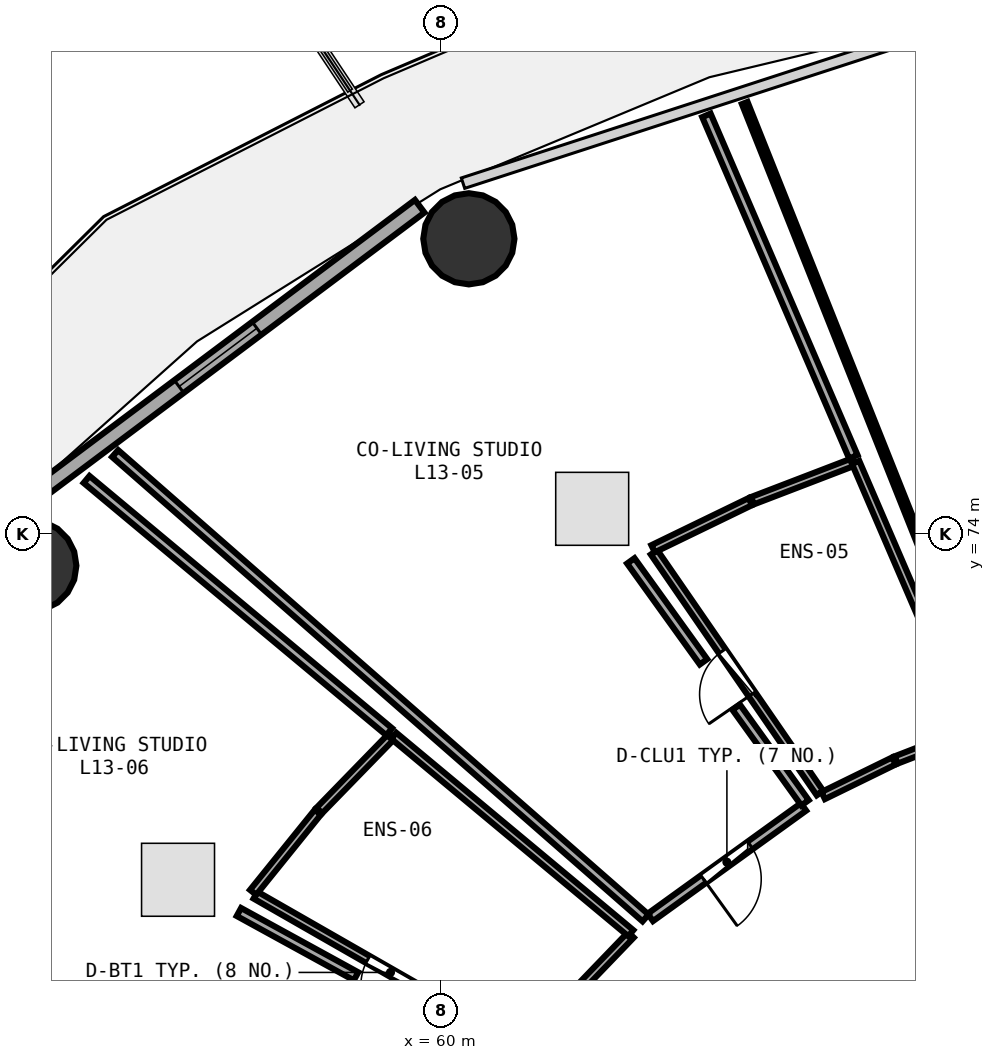
"""IFC4 building model, lengths in metres.
Left out: names, types, materials, properties, quantities, classifications, styles, units other than length and angle.
Written with IfcOpenShell. Run it as: python <this file> out.ifc"""

import sys

from ifc_helpers import new_model, si_unit, direction, frame, frame_2d, origin, origin_2d, place, context, subcontext, project, spatial, rectangle, circle, extrude, element, fill, save


model = new_model("IFC4")
c1 = context("Model", 3, precision=1e-05, world=origin(), true_north=direction((0.0, 1.0)))
c2 = subcontext(c1, "Body", "Model", "MODEL_VIEW")
j1 = project(units=[si_unit("LENGTHUNIT", "METRE"), si_unit("PLANEANGLEUNIT", "RADIAN")], contexts=[c1])
p1 = place(None, origin())
s1 = spatial("IfcSite", under=j1, at=p1, CompositionType="ELEMENT")
p2 = place(p1, origin())
s2 = spatial("IfcBuilding", under=s1, at=p2, CompositionType="ELEMENT")
p3 = place(p2, frame((0.0, 0.0, 52.5)))
s3 = spatial("IfcBuildingStorey", under=s2, at=p3, CompositionType="ELEMENT", Elevation=52.5)
for number, where, z_axis, x_axis in (
    (1, (60.46, 78.854, 0.0), (0.0, 0.0, 1.0), (1.0, 0.0, 0.0)),
    (2, (53.256, 73.478, 0.0), (0.0, 0.0, 1.0), (1.0, 0.0, 0.0)),
):
    element("IfcColumn", number, at=place(p3, frame(where, z_axis=z_axis, x_axis=x_axis)), inside=s3, PredefinedType="COLUMN", context=c2, shape_type="SweptSolid", body=[
        extrude(circle(Radius=0.75, at=origin_2d()), origin(), (0.0, 0.0, 1.0), 3.75),
    ])
p4 = place(p3, frame((59.651, 79.389, 0.0), z_axis=(0.0, 0.0, 1.0), x_axis=(-0.80030733173, -0.599590005569, 0.0)))
e3 = element("IfcWall", 3, at=p4, inside=s3, PredefinedType="SOLIDWALL", context=c2, shape_type="SweptSolid", body=[
    extrude(rectangle(XDim=8.291, YDim=0.26, at=frame_2d((4.145, 0.0))), origin(), (0.0, 0.0, 1.0), 3.475),
])
p5 = place(p4, frame((3.345, 0.0, 0.85)))
e4 = element("IfcOpeningElement", 4, at=p5, cuts=e3, PredefinedType="OPENING", context=c2, shape_type="SweptSolid", body=[
    extrude(rectangle(XDim=1.6, YDim=1.45, at=frame_2d((0.8, 0.725))), frame((0.0, 0.14, 0.0), z_axis=(0.0, -1.0, 0.0), x_axis=(1.0, 0.0, 0.0)), (0.0, 0.0, 1.0), 0.28),
])
p6 = place(p3, frame((66.235, 69.738, 0.0), z_axis=(0.0, 0.0, 1.0), x_axis=(-0.567426867042, 0.823423797664, 0.0)))
e5 = element("IfcWall", 5, at=p6, inside=s3, PredefinedType="PLUMBINGWALL", context=c2, shape_type="SweptSolid", body=[
    extrude(rectangle(XDim=4.809, YDim=0.13, at=frame_2d((2.405, 0.0))), origin(), (0.0, 0.0, 1.0), 3.175),
])
p7 = place(p6, frame((1.975, 0.0, 0.0)))
e6 = element("IfcOpeningElement", 6, at=p7, cuts=e5, PredefinedType="OPENING", context=c2, shape_type="SweptSolid", body=[
    extrude(rectangle(XDim=0.86, YDim=2.05, at=frame_2d((0.43, 1.025))), frame((0.0, 0.075, 0.0), z_axis=(0.0, -1.0, 0.0), x_axis=(1.0, 0.0, 0.0)), (0.0, 0.0, 1.0), 0.15),
])
p8 = place(p3, frame((65.963, 69.511, 0.0), z_axis=(0.0, 0.0, 1.0), x_axis=(-0.811021116066, -0.585016879496, 0.0)))
e7 = element("IfcWall", 7, at=p8, inside=s3, PredefinedType="PARTITIONING", context=c2, shape_type="SweptSolid", body=[
    extrude(rectangle(XDim=3.106, YDim=0.15, at=frame_2d((1.553, 0.0))), origin(), (0.0, 0.0, 1.0), 2.875),
])
p9 = place(p8, frame((1.078, 0.0, 0.0)))
e8 = element("IfcOpeningElement", 8, at=p9, cuts=e7, PredefinedType="OPENING", context=c2, shape_type="SweptSolid", body=[
    extrude(rectangle(XDim=0.95, YDim=2.08, at=frame_2d((0.475, 1.04))), frame((0.0, 0.085, 0.0), z_axis=(0.0, -1.0, 0.0), x_axis=(1.0, 0.0, 0.0)), (0.0, 0.0, 1.0), 0.17),
])
p10 = place(p3, frame((61.39, 65.519, 0.0), z_axis=(0.0, 0.0, 1.0), x_axis=(-0.867813964862, 0.496889245598, 0.0)))
e9 = element("IfcWall", 9, at=p10, inside=s3, PredefinedType="PLUMBINGWALL", context=c2, shape_type="SweptSolid", body=[
    extrude(rectangle(XDim=5.115, YDim=0.13, at=frame_2d((2.557, 0.0))), origin(), (0.0, 0.0, 1.0), 2.875),
])
p11 = place(p10, frame((2.127, 0.0, 0.0)))
e10 = element("IfcOpeningElement", 10, at=p11, cuts=e9, PredefinedType="OPENING", context=c2, shape_type="SweptSolid", body=[
    extrude(rectangle(XDim=0.86, YDim=2.05, at=frame_2d((0.43, 1.025))), frame((0.0, 0.075, 0.0), z_axis=(0.0, -1.0, 0.0), x_axis=(1.0, 0.0, 0.0)), (0.0, 0.0, 1.0), 0.15),
])
p12 = place(p3, frame((69.053, 70.912, 0.0), z_axis=(0.0, 0.0, 1.0), x_axis=(-0.370325956987, 0.928901870803, 0.0)))
e11 = element("IfcWall", 11, at=p12, inside=s3, PredefinedType="PARTITIONING", context=c2, shape_type="SweptSolid", body=[
    extrude(rectangle(XDim=10.954, YDim=0.1, at=frame_2d((5.477, 0.0))), origin(), (0.0, 0.0, 1.0), 2.875),
])
p13 = place(p3, frame((68.703, 70.755, 0.0), z_axis=(0.0, 0.0, 1.0), x_axis=(-0.932299479839, -0.361687268082, 0.0)))
e12 = element("IfcWall", 12, at=p13, inside=s3, PredefinedType="PLUMBINGWALL", context=c2, shape_type="SweptSolid", body=[
    extrude(rectangle(XDim=1.304, YDim=0.13, at=frame_2d((0.652, 0.0))), origin(), (0.0, 0.0, 1.0), 3.48),
])
p14 = place(p3, frame((67.451, 70.267, 0.0), z_axis=(0.0, 0.0, 1.0), x_axis=(-0.898275282077, -0.439433177639, 0.0)))
e13 = element("IfcWall", 13, at=p14, inside=s3, PredefinedType="PLUMBINGWALL", context=c2, shape_type="SweptSolid", body=[
    extrude(rectangle(XDim=1.296, YDim=0.13, at=frame_2d((0.648, 0.0))), origin(), (0.0, 0.0, 1.0), 3.48),
])
p15 = place(p3, frame((63.49, 73.757, 0.0), z_axis=(0.0, 0.0, 1.0), x_axis=(0.899832096889, 0.436236400829, 0.0)))
e14 = element("IfcWall", 14, at=p15, inside=s3, PredefinedType="PLUMBINGWALL", context=c2, shape_type="SweptSolid", body=[
    extrude(rectangle(XDim=1.776, YDim=0.13, at=frame_2d((0.888, 0.0))), origin(), (0.0, 0.0, 1.0), 3.48),
])
p16 = place(p3, frame((65.125, 74.547, 0.0), z_axis=(0.0, 0.0, 1.0), x_axis=(0.93361980904, 0.35826533766, 0.0)))
e15 = element("IfcWall", 15, at=p16, inside=s3, PredefinedType="PLUMBINGWALL", context=c2, shape_type="SweptSolid", body=[
    extrude(rectangle(XDim=1.788, YDim=0.13, at=frame_2d((0.894, 0.0))), origin(), (0.0, 0.0, 1.0), 3.48),
])
p17 = place(p3, frame((66.821, 75.177, 0.0), z_axis=(0.0, 0.0, 1.0), x_axis=(0.395562338017, -0.918439130668, 0.0)))
e16 = element("IfcWall", 16, at=p17, inside=s3, PredefinedType="PLUMBINGWALL", context=c2, shape_type="SweptSolid", body=[
    extrude(rectangle(XDim=4.786, YDim=0.13, at=frame_2d((2.393, 0.0))), origin(), (0.0, 0.0, 1.0), 3.175),
])
p18 = place(p3, frame((63.366, 67.685, 0.0), z_axis=(0.0, 0.0, 1.0), x_axis=(-0.752403187404, 0.658702849231, 0.0)))
e17 = element("IfcWall", 17, at=p18, inside=s3, PredefinedType="PARTITIONING", context=c2, shape_type="SweptSolid", body=[
    extrude(rectangle(XDim=11.595, YDim=0.15, at=frame_2d((5.797, 0.0))), origin(), (0.0, 0.0, 1.0), 2.875),
])
p19 = place(p3, frame((64.367, 80.884, 0.0), z_axis=(0.0, 0.0, 1.0), x_axis=(0.395282873179, -0.918559442917, 0.0)))
e18 = element("IfcWall", 18, at=p19, inside=s3, PredefinedType="PARTITIONING", context=c2, shape_type="SweptSolid", body=[
    extrude(rectangle(XDim=6.113, YDim=0.15, at=frame_2d((3.057, 0.0))), origin(), (0.0, 0.0, 1.0), 2.875),
])
p20 = place(p3, frame((63.123, 73.558, 0.0), z_axis=(0.0, 0.0, 1.0), x_axis=(0.58432672942, -0.811518498425, 0.0)))
e19 = element("IfcWall", 19, at=p20, inside=s3, PredefinedType="PARTITIONING", context=c2, shape_type="SweptSolid", body=[
    extrude(rectangle(XDim=2.046, YDim=0.15, at=frame_2d((1.023, 0.0))), origin(), (0.0, 0.0, 1.0), 3.175),
])
p21 = place(p3, frame((64.857, 71.151, 0.0), z_axis=(0.0, 0.0, 1.0), x_axis=(0.584298085417, -0.811539122519, 0.0)))
e20 = element("IfcWall", 20, at=p21, inside=s3, PredefinedType="PARTITIONING", context=c2, shape_type="SweptSolid", body=[
    extrude(rectangle(XDim=1.937, YDim=0.15, at=frame_2d((0.969, 0.0))), origin(), (0.0, 0.0, 1.0), 3.235),
])
p22 = place(p3, frame((63.125, 67.408, 0.0), z_axis=(0.0, 0.0, 1.0), x_axis=(-0.693342211096, -0.720608477824, 0.0)))
e21 = element("IfcWall", 21, at=p22, inside=s3, PredefinedType="PLUMBINGWALL", context=c2, shape_type="SweptSolid", body=[
    extrude(rectangle(XDim=1.254, YDim=0.13, at=frame_2d((0.627, 0.0))), origin(), (0.0, 0.0, 1.0), 2.875),
])
p23 = place(p3, frame((56.912, 68.106, 0.0), z_axis=(0.0, 0.0, 1.0), x_axis=(0.628152519701, 0.778090233837, 0.0)))
e22 = element("IfcWall", 22, at=p23, inside=s3, PredefinedType="PLUMBINGWALL", context=c2, shape_type="SweptSolid", body=[
    extrude(rectangle(XDim=1.693, YDim=0.13, at=frame_2d((0.847, 0.0))), origin(), (0.0, 0.0, 1.0), 3.175),
])
p24 = place(p3, frame((58.002, 69.453, 0.0), z_axis=(0.0, 0.0, 1.0), x_axis=(0.697337129747, 0.716743278641, 0.0)))
e23 = element("IfcWall", 23, at=p24, inside=s3, PredefinedType="PLUMBINGWALL", context=c2, shape_type="SweptSolid", body=[
    extrude(rectangle(XDim=1.711, YDim=0.13, at=frame_2d((0.855, 0.0))), origin(), (0.0, 0.0, 1.0), 2.875),
])
p25 = place(p3, frame((59.224, 70.681, 0.0), z_axis=(0.0, 0.0, 1.0), x_axis=(0.768509127281, -0.63983882446, 0.0)))
e24 = element("IfcWall", 24, at=p25, inside=s3, PredefinedType="PLUMBINGWALL", context=c2, shape_type="SweptSolid", body=[
    extrude(rectangle(XDim=5.074, YDim=0.13, at=frame_2d((2.537, 0.0))), origin(), (0.0, 0.0, 1.0), 3.175),
])
p26 = place(p3, frame((54.173, 74.896, 0.0), z_axis=(0.0, 0.0, 1.0), x_axis=(0.768100814479, -0.640328930157, 0.0)))
e25 = element("IfcWall", 25, at=p26, inside=s3, PredefinedType="PARTITIONING", context=c2, shape_type="SweptSolid", body=[
    extrude(rectangle(XDim=6.479, YDim=0.15, at=frame_2d((3.24, 0.0))), origin(), (0.0, 0.0, 1.0), 2.875),
])
p27 = place(p3, frame((56.678, 67.783, 0.0), z_axis=(0.0, 0.0, 1.0), x_axis=(0.876780673324, -0.480890477017, 0.0)))
e26 = element("IfcWall", 26, at=p27, inside=s3, PredefinedType="PARTITIONING", context=c2, shape_type="SweptSolid", body=[
    extrude(rectangle(XDim=2.197, YDim=0.15, at=frame_2d((1.099, 0.0))), origin(), (0.0, 0.0, 1.0), 3.175),
])
p28 = place(p5, origin())
e27 = element("IfcWindow", 27, at=p28, inside=s3, PartitioningType="SINGLE_PANEL", PredefinedType="WINDOW", context=c2, shape_type="SweptSolid", body=[
    extrude(rectangle(XDim=1.6, YDim=1.45, at=frame_2d((0.8, 0.725))), frame((0.0, 0.03, 0.0), z_axis=(0.0, -1.0, 0.0), x_axis=(1.0, 0.0, 0.0)), (0.0, 0.0, 1.0), 0.06),
])
fill(e4, e27)
p29 = place(p7, origin())
e28 = element("IfcDoor", 28, at=p29, inside=s3, OperationType="SINGLE_SWING_LEFT", PredefinedType="DOOR", context=c2, shape_type="SweptSolid", body=[
    extrude(rectangle(XDim=0.86, YDim=2.05, at=frame_2d((0.43, 1.025))), frame((0.0, 0.025, 0.0), z_axis=(0.0, -1.0, 0.0), x_axis=(1.0, 0.0, 0.0)), (0.0, 0.0, 1.0), 0.05),
])
fill(e6, e28)
p30 = place(p9, origin())
e29 = element("IfcDoor", 29, at=p30, inside=s3, OperationType="SINGLE_SWING_RIGHT", PredefinedType="DOOR", context=c2, shape_type="SweptSolid", body=[
    extrude(rectangle(XDim=0.95, YDim=2.08, at=frame_2d((0.475, 1.04))), frame((0.0, 0.025, 0.0), z_axis=(0.0, -1.0, 0.0), x_axis=(1.0, 0.0, 0.0)), (0.0, 0.0, 1.0), 0.05),
])
fill(e8, e29)
p31 = place(p11, origin())
e30 = element("IfcDoor", 30, at=p31, inside=s3, OperationType="SINGLE_SWING_LEFT", PredefinedType="DOOR", context=c2, shape_type="SweptSolid", body=[
    extrude(rectangle(XDim=0.86, YDim=2.05, at=frame_2d((0.43, 1.025))), frame((0.0, 0.025, 0.0), z_axis=(0.0, -1.0, 0.0), x_axis=(1.0, 0.0, 0.0)), (0.0, 0.0, 1.0), 0.05),
])
fill(e10, e30)
save(model, sys.argv[1])
